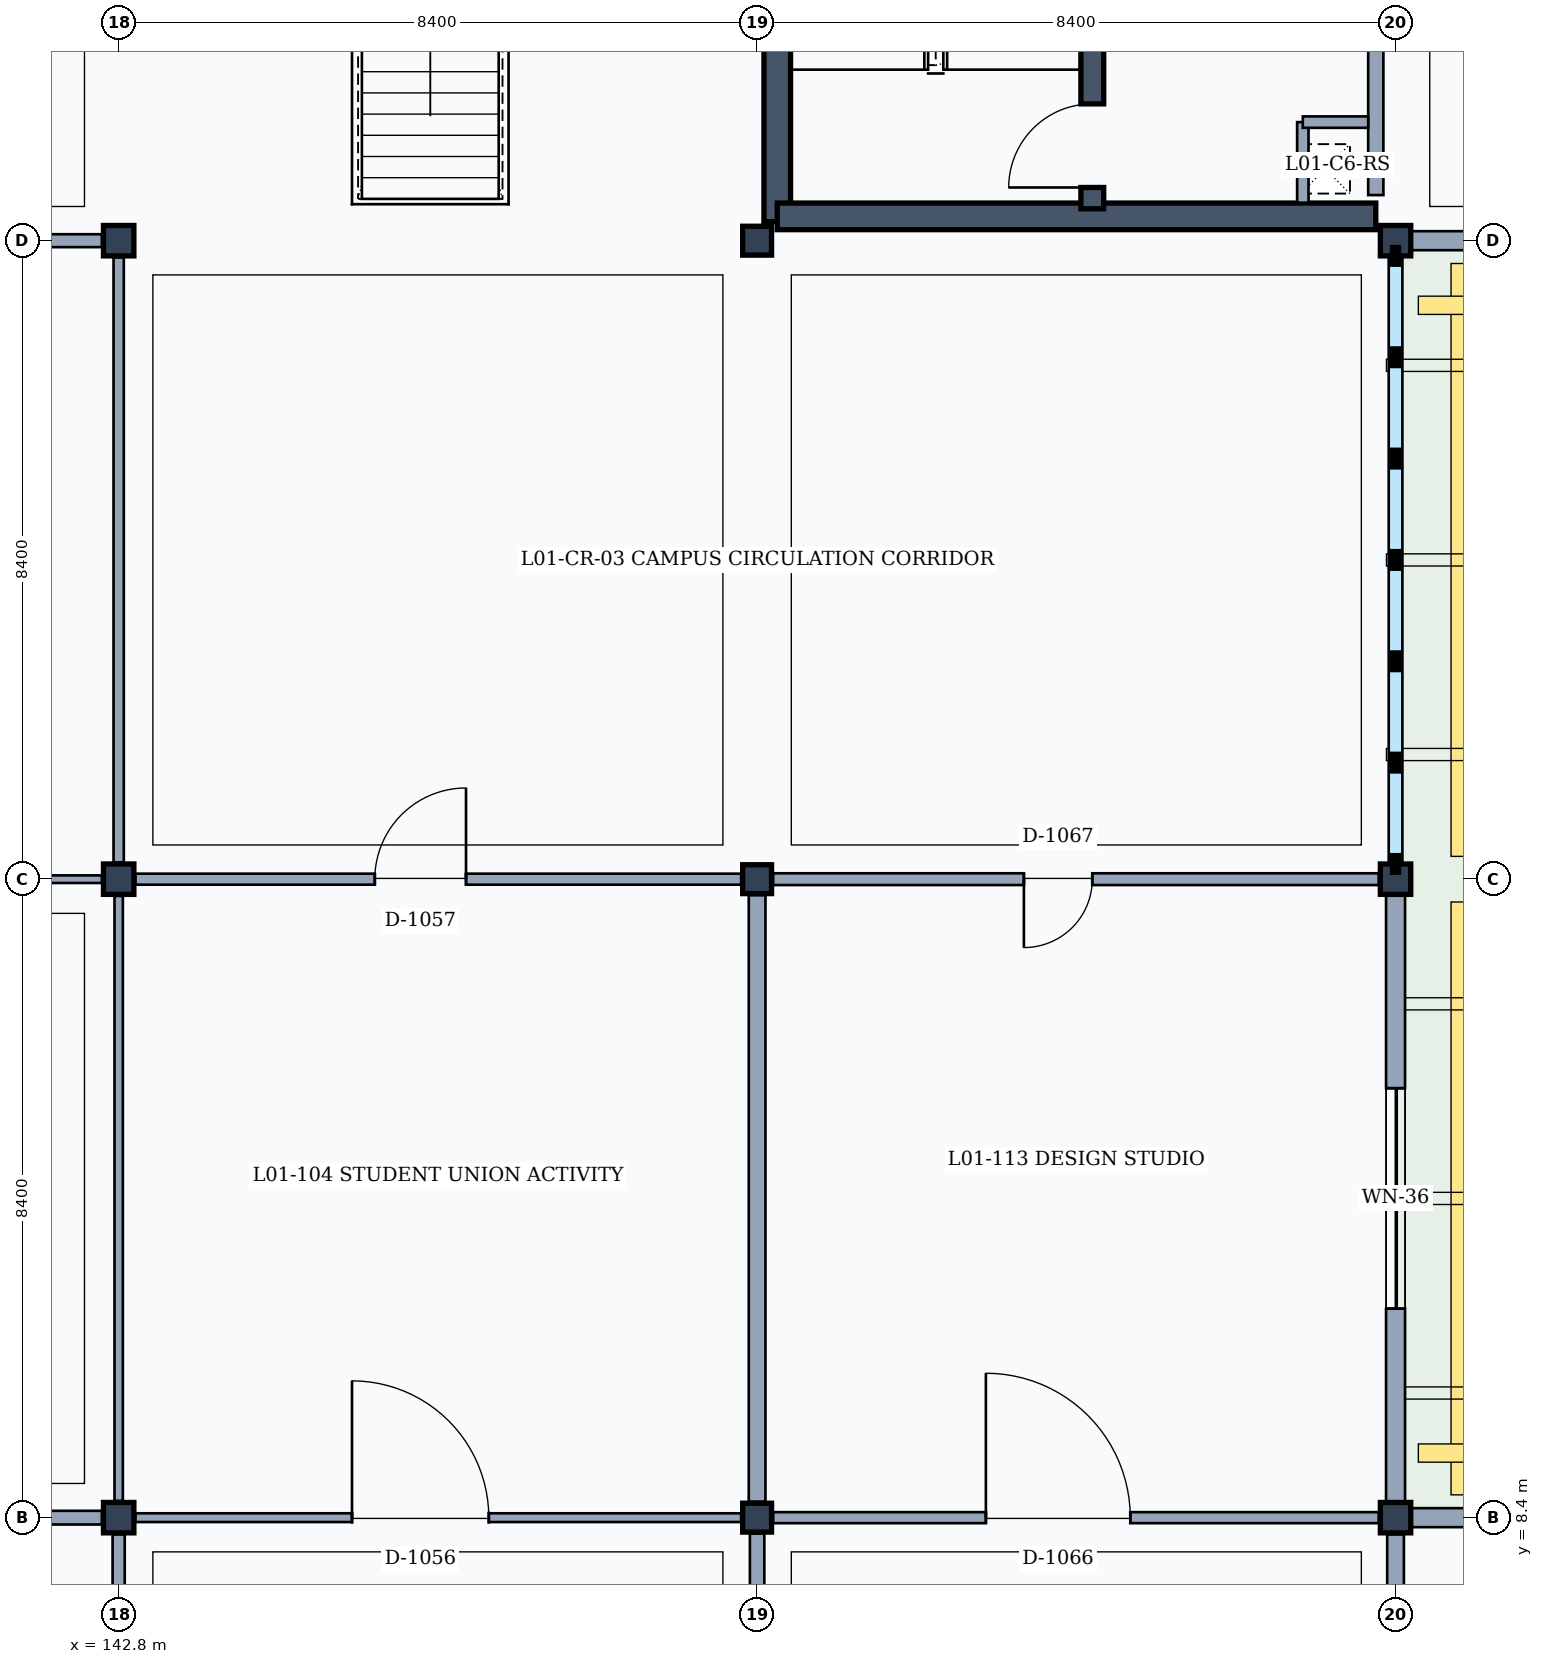
"""IFC4 building model, lengths in metres.
Left out: names, types, materials, properties, quantities, classifications, styles, units other than length and angle.
Written with IfcOpenShell. Run it as: python <this file> out.ifc"""

import sys

from ifc_helpers import new_model, si_unit, direction, frame, frame_2d, origin, origin_2d, place, context, subcontext, project, spatial, rectangle, extrude, element, fill, save


model = new_model("IFC4")
c1 = context("Model", 3, precision=1e-05, world=origin(), true_north=direction((0.0, 1.0)))
c2 = subcontext(c1, "Body", "Model", "MODEL_VIEW")
j1 = project(units=[si_unit("LENGTHUNIT", "METRE"), si_unit("PLANEANGLEUNIT", "RADIAN")], contexts=[c1])
p1 = place(None, origin())
s1 = spatial("IfcSite", under=j1, at=p1, CompositionType="ELEMENT")
p2 = place(p1, origin())
s2 = spatial("IfcBuilding", under=s1, at=p2, CompositionType="ELEMENT")
p3 = place(p2, frame((0.0, 0.0, 4.8)))
s3 = spatial("IfcBuildingStorey", under=s2, at=p3, CompositionType="ELEMENT", Elevation=4.8)
for number, where, z_axis, x_axis in (
    (1, (142.8, 8.4, 0.0), (0.0, 0.0, 1.0), (1.0, 0.0, 0.0)),
    (2, (142.8, 16.8, 0.0), (0.0, 0.0, 1.0), (1.0, 0.0, 0.0)),
    (3, (142.8, 25.2, 0.0), (0.0, 0.0, 1.0), (1.0, 0.0, 0.0)),
):
    element("IfcColumn", number, at=place(p3, frame(where, z_axis=z_axis, x_axis=x_axis)), inside=s3, PredefinedType="COLUMN", context=c2, shape_type="SweptSolid", body=[
        extrude(rectangle(XDim=0.4, YDim=0.4, at=origin_2d()), origin(), (0.0, 0.0, 1.0), 4.8),
    ])
for number, where, z_axis, x_axis in (
    (4, (151.2, 8.4, 0.0), (0.0, 0.0, 1.0), (1.0, 0.0, 0.0)),
    (5, (151.2, 16.8, 0.0), (0.0, 0.0, 1.0), (1.0, 0.0, 0.0)),
    (6, (151.2, 25.2, 0.0), (0.0, 0.0, 1.0), (1.0, 0.0, 0.0)),
):
    element("IfcColumn", number, at=place(p3, frame(where, z_axis=z_axis, x_axis=x_axis)), inside=s3, PredefinedType="COLUMN", context=c2, shape_type="SweptSolid", body=[
        extrude(rectangle(XDim=0.38, YDim=0.38, at=origin_2d()), origin(), (0.0, 0.0, 1.0), 4.8),
    ])
for number, where, z_axis, x_axis in (
    (7, (159.6, 8.4, 0.0), (0.0, 0.0, 1.0), (1.0, 0.0, 0.0)),
    (8, (159.6, 16.8, 0.0), (0.0, 0.0, 1.0), (1.0, 0.0, 0.0)),
    (9, (159.6, 25.2, 0.0), (0.0, 0.0, 1.0), (1.0, 0.0, 0.0)),
):
    element("IfcColumn", number, at=place(p3, frame(where, z_axis=z_axis, x_axis=x_axis)), inside=s3, PredefinedType="COLUMN", context=c2, shape_type="SweptSolid", body=[
        extrude(rectangle(XDim=0.4, YDim=0.4, at=origin_2d()), origin(), (0.0, 0.0, 1.0), 4.8),
    ])
p4 = place(p3, frame((159.6, 16.6, 0.0), z_axis=(0.0, 0.0, 1.0), x_axis=(0.0, -1.0, 0.0)))
e10 = element("IfcWall", 10, at=p4, inside=s3, PredefinedType="SOLIDWALL", context=c2, shape_type="SweptSolid", body=[
    extrude(rectangle(XDim=8.0, YDim=0.25, at=frame_2d((4.0, 0.0))), origin(), (0.0, 0.0, 1.0), 3.96),
])
p5 = place(p4, frame((2.55, 0.0, 0.9)))
e11 = element("IfcOpeningElement", 11, at=p5, cuts=e10, PredefinedType="OPENING", context=c2, shape_type="SweptSolid", body=[
    extrude(rectangle(XDim=2.9, YDim=1.75, at=frame_2d((1.45, 0.875))), frame((0.0, 0.135, 0.0), z_axis=(0.0, -1.0, 0.0), x_axis=(1.0, 0.0, 0.0)), (0.0, 0.0, 1.0), 0.27),
])
p6 = place(p3, frame((159.8, 8.4, 0.0), z_axis=(0.0, 0.0, 1.0), x_axis=(1.0, 0.0, 0.0)))
e12 = element("IfcWall", 12, at=p6, inside=s3, PredefinedType="SOLIDWALL", context=c2, shape_type="SweptSolid", body=[
    extrude(rectangle(XDim=8.01, YDim=0.25, at=frame_2d((4.005, 0.0))), origin(), (0.0, 0.0, 1.0), 3.93),
])
p7 = place(p6, frame((2.805, 0.0, 0.9)))
e13 = element("IfcOpeningElement", 13, at=p7, cuts=e12, PredefinedType="OPENING", context=c2, shape_type="SweptSolid", body=[
    extrude(rectangle(XDim=2.4, YDim=1.8, at=frame_2d((1.2, 0.9))), frame((0.0, 0.135, 0.0), z_axis=(0.0, -1.0, 0.0), x_axis=(1.0, 0.0, 0.0)), (0.0, 0.0, 1.0), 0.27),
])
p8 = place(p3, frame((167.81, 25.2, 0.0), z_axis=(0.0, 0.0, 1.0), x_axis=(-1.0, 0.0, 0.0)))
e14 = element("IfcWall", 14, at=p8, inside=s3, PredefinedType="SOLIDWALL", context=c2, shape_type="SweptSolid", body=[
    extrude(rectangle(XDim=8.01, YDim=0.25, at=frame_2d((4.005, 0.0))), origin(), (0.0, 0.0, 1.0), 3.95),
])
p9 = place(p8, frame((3.005, 0.0, 0.9)))
e15 = element("IfcOpeningElement", 15, at=p9, cuts=e14, PredefinedType="OPENING", context=c2, shape_type="SweptSolid", body=[
    extrude(rectangle(XDim=2.0, YDim=1.7, at=frame_2d((1.0, 0.85))), frame((0.0, 0.135, 0.0), z_axis=(0.0, -1.0, 0.0), x_axis=(1.0, 0.0, 0.0)), (0.0, 0.0, 1.0), 0.27),
])
p10 = place(p3, frame((151.465, 25.45, 0.0), z_axis=(0.0, 0.0, 1.0), x_axis=(0.0, 1.0, 0.0)))
e16 = element("IfcWall", 16, at=p10, inside=s3, PredefinedType="SHEAR", context=c2, shape_type="SweptSolid", body=[
    extrude(rectangle(XDim=7.94, YDim=0.35, at=frame_2d((3.97, 0.0))), origin(), (0.0, 0.0, 1.0), 4.55),
])
p11 = place(p3, frame((159.34, 33.0, 0.0), z_axis=(0.0, 0.0, 1.0), x_axis=(0.0, -1.0, 0.0)))
e17 = element("IfcWall", 17, at=p11, inside=s3, PredefinedType="PARTITIONING", context=c2, shape_type="SweptSolid", body=[
    extrude(rectangle(XDim=7.2, YDim=0.2, at=frame_2d((3.6, 0.0))), origin(), (0.0, 0.0, 1.0), 3.92),
])
p12 = place(p11, frame((3.55, 0.0, 0.0)))
e18 = element("IfcOpeningElement", 18, at=p12, cuts=e17, PredefinedType="OPENING", context=c2, shape_type="SweptSolid", body=[
    extrude(rectangle(XDim=1.1, YDim=2.15, at=frame_2d((0.55, 1.075))), frame((0.0, 0.11, 0.0), z_axis=(0.0, -1.0, 0.0), x_axis=(1.0, 0.0, 0.0)), (0.0, 0.0, 1.0), 0.22),
])
p13 = place(p3, frame((159.34, 25.52, 0.0), z_axis=(0.0, 0.0, 1.0), x_axis=(-1.0, 0.0, 0.0)))
e19 = element("IfcWall", 19, at=p13, inside=s3, PredefinedType="SHEAR", context=c2, shape_type="SweptSolid", body=[
    extrude(rectangle(XDim=7.875, YDim=0.35, at=frame_2d((3.938, 0.0))), origin(), (0.0, 0.0, 1.0), 4.55),
])
p14 = place(p3, frame((155.61, 25.62, 0.0), z_axis=(0.0, 0.0, 1.0), x_axis=(0.0, 1.0, 0.0)))
e20 = element("IfcWall", 20, at=p14, inside=s3, PredefinedType="SHEAR", context=c2, shape_type="SweptSolid", body=[
    extrude(rectangle(XDim=7.38, YDim=0.3, at=frame_2d((3.69, 0.0))), origin(), (0.0, 0.0, 1.0), 4.55),
])
p15 = place(p14, frame((0.28, 0.0, 0.0)))
e21 = element("IfcOpeningElement", 21, at=p15, cuts=e20, PredefinedType="OPENING", context=c2, shape_type="SweptSolid", body=[
    extrude(rectangle(XDim=1.1, YDim=2.15, at=frame_2d((0.55, 1.075))), frame((0.0, 0.16, 0.0), z_axis=(0.0, -1.0, 0.0), x_axis=(1.0, 0.0, 0.0)), (0.0, 0.0, 1.0), 0.32),
])
p16 = place(p3, frame((158.38, 26.76, 0.0), z_axis=(0.0, 0.0, 1.0), x_axis=(0.0, -1.0, 0.0)))
e22 = element("IfcWall", 22, at=p16, inside=s3, PredefinedType="PARTITIONING", context=c2, shape_type="SweptSolid", body=[
    extrude(rectangle(XDim=1.06, YDim=0.15, at=frame_2d((0.53, 0.0))), origin(), (0.0, 0.0, 1.0), 3.92),
])
p17 = place(p3, frame((158.38, 26.76, 0.0), z_axis=(0.0, 0.0, 1.0), x_axis=(1.0, 0.0, 0.0)))
e23 = element("IfcWall", 23, at=p17, inside=s3, PredefinedType="PARTITIONING", context=c2, shape_type="SweptSolid", body=[
    extrude(rectangle(XDim=0.86, YDim=0.15, at=frame_2d((0.43, 0.0))), origin(), (0.0, 0.0, 1.0), 3.92),
])
p18 = place(p3, frame((142.8, 0.2, 0.0), z_axis=(0.0, 0.0, 1.0), x_axis=(0.0, 1.0, 0.0)))
e24 = element("IfcWall", 24, at=p18, inside=s3, PredefinedType="PARTITIONING", context=c2, shape_type="SweptSolid", body=[
    extrude(rectangle(XDim=7.98, YDim=0.16, at=frame_2d((3.99, 0.0))), origin(), (0.0, 0.0, 1.0), 3.92),
])
p19 = place(p3, frame((134.61, 8.4, 0.0), z_axis=(0.0, 0.0, 1.0), x_axis=(1.0, 0.0, 0.0)))
e25 = element("IfcWall", 25, at=p19, inside=s3, PredefinedType="PARTITIONING", context=c2, shape_type="SweptSolid", body=[
    extrude(rectangle(XDim=7.97, YDim=0.18, at=frame_2d((3.985, 0.0))), origin(), (0.0, 0.0, 1.0), 3.89),
])
p20 = place(p19, frame((3.175, 0.0, 0.0)))
e26 = element("IfcOpeningElement", 26, at=p20, cuts=e25, PredefinedType="OPENING", context=c2, shape_type="SweptSolid", body=[
    extrude(rectangle(XDim=1.15, YDim=2.25, at=frame_2d((0.575, 1.125))), frame((0.0, 0.1, 0.0), z_axis=(0.0, -1.0, 0.0), x_axis=(1.0, 0.0, 0.0)), (0.0, 0.0, 1.0), 0.2),
])
p21 = place(p3, frame((142.8, 8.62, 0.0), z_axis=(0.0, 0.0, 1.0), x_axis=(0.0, 1.0, 0.0)))
e27 = element("IfcWall", 27, at=p21, inside=s3, PredefinedType="PARTITIONING", context=c2, shape_type="SweptSolid", body=[
    extrude(rectangle(XDim=7.96, YDim=0.11, at=frame_2d((3.98, 0.0))), origin(), (0.0, 0.0, 1.0), 3.92),
])
p22 = place(p3, frame((134.61, 16.8, 0.0), z_axis=(0.0, 0.0, 1.0), x_axis=(1.0, 0.0, 0.0)))
e28 = element("IfcWall", 28, at=p22, inside=s3, PredefinedType="MOVABLE", context=c2, shape_type="SweptSolid", body=[
    extrude(rectangle(XDim=7.97, YDim=0.1, at=frame_2d((3.985, 0.0))), origin(), (0.0, 0.0, 1.0), 3.89),
])
p23 = place(p22, frame((3.1, 0.0, 0.0)))
e29 = element("IfcOpeningElement", 29, at=p23, cuts=e28, PredefinedType="OPENING", context=c2, shape_type="SweptSolid", body=[
    extrude(rectangle(XDim=1.3, YDim=2.2, at=frame_2d((0.65, 1.1))), frame((0.0, 0.06, 0.0), z_axis=(0.0, -1.0, 0.0), x_axis=(1.0, 0.0, 0.0)), (0.0, 0.0, 1.0), 0.12),
])
p24 = place(p3, frame((142.8, 17.02, 0.0), z_axis=(0.0, 0.0, 1.0), x_axis=(0.0, 1.0, 0.0)))
e30 = element("IfcWall", 30, at=p24, inside=s3, PredefinedType="PARTITIONING", context=c2, shape_type="SweptSolid", body=[
    extrude(rectangle(XDim=7.96, YDim=0.135, at=frame_2d((3.98, 0.0))), origin(), (0.0, 0.0, 1.0), 3.92),
])
p25 = place(p3, frame((134.61, 25.2, 0.0), z_axis=(0.0, 0.0, 1.0), x_axis=(1.0, 0.0, 0.0)))
e31 = element("IfcWall", 31, at=p25, inside=s3, PredefinedType="PARTITIONING", context=c2, shape_type="SweptSolid", body=[
    extrude(rectangle(XDim=7.97, YDim=0.17, at=frame_2d((3.985, 0.0))), origin(), (0.0, 0.0, 1.0), 3.89),
])
p26 = place(p25, frame((2.975, 0.0, 0.0)))
e32 = element("IfcOpeningElement", 32, at=p26, cuts=e31, PredefinedType="OPENING", context=c2, shape_type="SweptSolid", body=[
    extrude(rectangle(XDim=1.55, YDim=2.35, at=frame_2d((0.775, 1.175))), frame((0.0, 0.095, 0.0), z_axis=(0.0, -1.0, 0.0), x_axis=(1.0, 0.0, 0.0)), (0.0, 0.0, 1.0), 0.19),
])
p27 = place(p3, frame((151.2, 0.2, 0.0), z_axis=(0.0, 0.0, 1.0), x_axis=(0.0, 1.0, 0.0)))
e33 = element("IfcWall", 33, at=p27, inside=s3, PredefinedType="PARTITIONING", context=c2, shape_type="SweptSolid", body=[
    extrude(rectangle(XDim=7.99, YDim=0.19, at=frame_2d((3.995, 0.0))), origin(), (0.0, 0.0, 1.0), 3.92),
])
p28 = place(p3, frame((143.02, 8.4, 0.0), z_axis=(0.0, 0.0, 1.0), x_axis=(1.0, 0.0, 0.0)))
e34 = element("IfcWall", 34, at=p28, inside=s3, PredefinedType="PARTITIONING", context=c2, shape_type="SweptSolid", body=[
    extrude(rectangle(XDim=7.97, YDim=0.115, at=frame_2d((3.985, 0.0))), origin(), (0.0, 0.0, 1.0), 3.92),
])
p29 = place(p28, frame((2.85, 0.0, 0.0)))
e35 = element("IfcOpeningElement", 35, at=p29, cuts=e34, PredefinedType="OPENING", context=c2, shape_type="SweptSolid", body=[
    extrude(rectangle(XDim=1.8, YDim=2.3, at=frame_2d((0.9, 1.15))), frame((0.0, 0.067, 0.0), z_axis=(0.0, -1.0, 0.0), x_axis=(1.0, 0.0, 0.0)), (0.0, 0.0, 1.0), 0.135),
])
p30 = place(p3, frame((151.2, 8.61, 0.0), z_axis=(0.0, 0.0, 1.0), x_axis=(0.0, 1.0, 0.0)))
e36 = element("IfcWall", 36, at=p30, inside=s3, PredefinedType="PARTITIONING", context=c2, shape_type="SweptSolid", body=[
    extrude(rectangle(XDim=7.98, YDim=0.22, at=frame_2d((3.99, 0.0))), origin(), (0.0, 0.0, 1.0), 3.92),
])
p31 = place(p3, frame((143.02, 16.8, 0.0), z_axis=(0.0, 0.0, 1.0), x_axis=(1.0, 0.0, 0.0)))
e37 = element("IfcWall", 37, at=p31, inside=s3, PredefinedType="PARTITIONING", context=c2, shape_type="SweptSolid", body=[
    extrude(rectangle(XDim=7.97, YDim=0.145, at=frame_2d((3.985, 0.0))), origin(), (0.0, 0.0, 1.0), 3.92),
])
p32 = place(p31, frame((3.15, 0.0, 0.0)))
e38 = element("IfcOpeningElement", 38, at=p32, cuts=e37, PredefinedType="OPENING", context=c2, shape_type="SweptSolid", body=[
    extrude(rectangle(XDim=1.2, YDim=2.2, at=frame_2d((0.6, 1.1))), frame((0.0, 0.083, 0.0), z_axis=(0.0, -1.0, 0.0), x_axis=(1.0, 0.0, 0.0)), (0.0, 0.0, 1.0), 0.165),
])
p33 = place(p3, frame((159.6, 0.2, 0.0), z_axis=(0.0, 0.0, 1.0), x_axis=(0.0, 1.0, 0.0)))
e39 = element("IfcWall", 39, at=p33, inside=s3, PredefinedType="PARTITIONING", context=c2, shape_type="SweptSolid", body=[
    extrude(rectangle(XDim=7.98, YDim=0.22, at=frame_2d((3.99, 0.0))), origin(), (0.0, 0.0, 1.0), 3.92),
])
p34 = place(p33, frame((2.9, 0.0, 0.0)))
e40 = element("IfcOpeningElement", 40, at=p34, cuts=e39, PredefinedType="OPENING", context=c2, shape_type="SweptSolid", body=[
    extrude(rectangle(XDim=1.7, YDim=2.3, at=frame_2d((0.85, 1.15))), frame((0.0, 0.12, 0.0), z_axis=(0.0, -1.0, 0.0), x_axis=(1.0, 0.0, 0.0)), (0.0, 0.0, 1.0), 0.24),
])
p35 = place(p3, frame((151.41, 8.4, 0.0), z_axis=(0.0, 0.0, 1.0), x_axis=(1.0, 0.0, 0.0)))
e41 = element("IfcWall", 41, at=p35, inside=s3, PredefinedType="PARTITIONING", context=c2, shape_type="SweptSolid", body=[
    extrude(rectangle(XDim=7.97, YDim=0.145, at=frame_2d((3.985, 0.0))), origin(), (0.0, 0.0, 1.0), 3.92),
])
p36 = place(p35, frame((2.8, 0.0, 0.0)))
e42 = element("IfcOpeningElement", 42, at=p36, cuts=e41, PredefinedType="OPENING", context=c2, shape_type="SweptSolid", body=[
    extrude(rectangle(XDim=1.9, YDim=2.4, at=frame_2d((0.95, 1.2))), frame((0.0, 0.083, 0.0), z_axis=(0.0, -1.0, 0.0), x_axis=(1.0, 0.0, 0.0)), (0.0, 0.0, 1.0), 0.165),
])
p37 = place(p3, frame((151.41, 16.8, 0.0), z_axis=(0.0, 0.0, 1.0), x_axis=(1.0, 0.0, 0.0)))
e43 = element("IfcWall", 43, at=p37, inside=s3, PredefinedType="PARTITIONING", context=c2, shape_type="SweptSolid", body=[
    extrude(rectangle(XDim=7.97, YDim=0.155, at=frame_2d((3.985, 0.0))), origin(), (0.0, 0.0, 1.0), 3.92),
])
p38 = place(p37, frame((3.3, 0.0, 0.0)))
e44 = element("IfcOpeningElement", 44, at=p38, cuts=e43, PredefinedType="OPENING", context=c2, shape_type="SweptSolid", body=[
    extrude(rectangle(XDim=0.9, YDim=2.1, at=frame_2d((0.45, 1.05))), frame((0.0, 0.087, 0.0), z_axis=(0.0, -1.0, 0.0), x_axis=(1.0, 0.0, 0.0)), (0.0, 0.0, 1.0), 0.175),
])
p39 = place(p5, origin())
e45 = element("IfcWindow", 45, at=p39, inside=s3, PartitioningType="SINGLE_PANEL", PredefinedType="WINDOW", context=c2, shape_type="SweptSolid", body=[
    extrude(rectangle(XDim=2.9, YDim=1.75, at=frame_2d((1.45, 0.875))), frame((0.0, 0.03, 0.0), z_axis=(0.0, -1.0, 0.0), x_axis=(1.0, 0.0, 0.0)), (0.0, 0.0, 1.0), 0.06),
])
fill(e11, e45)
p40 = place(p15, origin())
e46 = element("IfcDoor", 46, at=p40, inside=s3, OperationType="SINGLE_SWING_LEFT", PredefinedType="DOOR", context=c2, shape_type="SweptSolid", body=[
    extrude(rectangle(XDim=1.1, YDim=2.15, at=frame_2d((0.55, 1.075))), frame((0.0, 0.025, 0.0), z_axis=(0.0, -1.0, 0.0), x_axis=(1.0, 0.0, 0.0)), (0.0, 0.0, 1.0), 0.05),
])
fill(e21, e46)
p41 = place(p29, origin())
e47 = element("IfcDoor", 47, at=p41, inside=s3, OperationType="SINGLE_SWING_LEFT", PredefinedType="DOOR", context=c2, shape_type="SweptSolid", body=[
    extrude(rectangle(XDim=1.8, YDim=2.3, at=frame_2d((0.9, 1.15))), frame((0.0, 0.025, 0.0), z_axis=(0.0, -1.0, 0.0), x_axis=(1.0, 0.0, 0.0)), (0.0, 0.0, 1.0), 0.05),
])
fill(e35, e47)
p42 = place(p32, origin())
e48 = element("IfcDoor", 48, at=p42, inside=s3, OperationType="SINGLE_SWING_RIGHT", PredefinedType="DOOR", context=c2, shape_type="SweptSolid", body=[
    extrude(rectangle(XDim=1.2, YDim=2.2, at=frame_2d((0.6, 1.1))), frame((0.0, 0.025, 0.0), z_axis=(0.0, -1.0, 0.0), x_axis=(1.0, 0.0, 0.0)), (0.0, 0.0, 1.0), 0.05),
])
fill(e38, e48)
p43 = place(p36, origin())
e49 = element("IfcDoor", 49, at=p43, inside=s3, OperationType="SINGLE_SWING_LEFT", PredefinedType="DOOR", context=c2, shape_type="SweptSolid", body=[
    extrude(rectangle(XDim=1.9, YDim=2.4, at=frame_2d((0.95, 1.2))), frame((0.0, 0.025, 0.0), z_axis=(0.0, -1.0, 0.0), x_axis=(1.0, 0.0, 0.0)), (0.0, 0.0, 1.0), 0.05),
])
fill(e42, e49)
p44 = place(p38, frame((0.9, 0.0, 0.0), z_axis=(0.0, 0.0, 1.0), x_axis=(-1.0, 0.0, 0.0)))
e50 = element("IfcDoor", 50, at=p44, inside=s3, OperationType="SINGLE_SWING_RIGHT", PredefinedType="DOOR", context=c2, shape_type="SweptSolid", body=[
    extrude(rectangle(XDim=0.9, YDim=2.1, at=frame_2d((0.45, 1.05))), frame((0.0, 0.025, 0.0), z_axis=(0.0, -1.0, 0.0), x_axis=(1.0, 0.0, 0.0)), (0.0, 0.0, 1.0), 0.05),
])
fill(e44, e50)
save(model, sys.argv[1])
